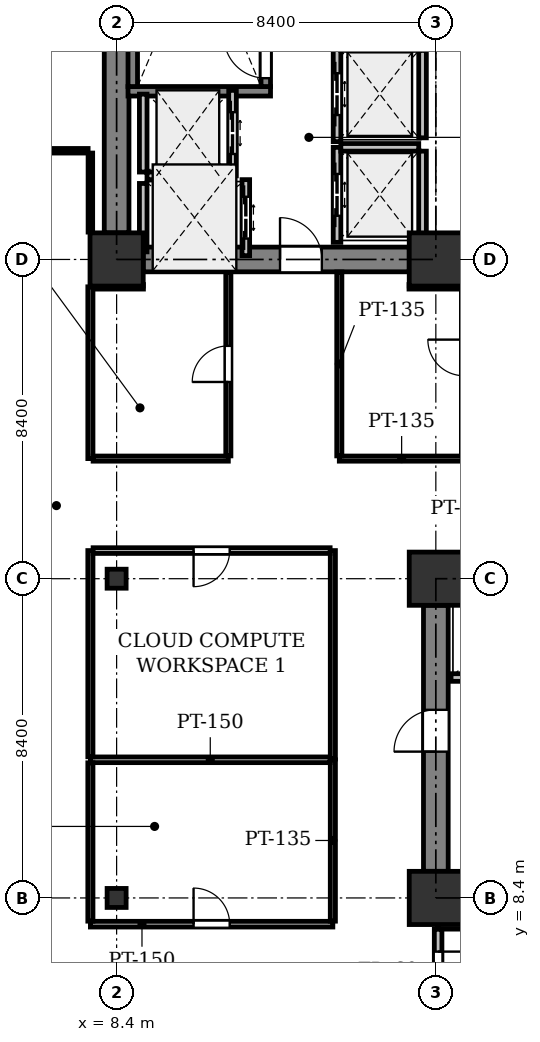
"""IFC4 building model, lengths in metres.
Left out: names, types, materials, properties, quantities, classifications, styles, units other than length and angle.
Written with IfcOpenShell. Run it as: python <this file> out.ifc"""

import sys

from ifc_helpers import new_model, si_unit, direction, frame, frame_2d, origin, origin_2d, place, context, subcontext, project, spatial, rectangle, i_section, extrude, element, fill, save


model = new_model("IFC4")
c1 = context("Model", 3, precision=1e-05, world=origin(), true_north=direction((0.0, 1.0)))
c2 = subcontext(c1, "Body", "Model", "MODEL_VIEW")
j1 = project(units=[si_unit("LENGTHUNIT", "METRE"), si_unit("PLANEANGLEUNIT", "RADIAN")], contexts=[c1])
p1 = place(None, origin())
s1 = spatial("IfcSite", under=j1, at=p1, CompositionType="ELEMENT")
p2 = place(p1, origin())
s2 = spatial("IfcBuilding", under=s1, at=p2, CompositionType="ELEMENT")
p3 = place(p2, frame((0.0, 0.0, 71.0)))
s3 = spatial("IfcBuildingStorey", under=s2, at=p3, CompositionType="ELEMENT", Elevation=71.0)
for number, where, z_axis, x_axis in (
    (1, (8.4, 8.4, 0.0), (0.0, 0.0, 1.0), (1.0, 0.0, 0.0)),
    (2, (8.4, 16.8, 0.0), (0.0, 0.0, 1.0), (1.0, 0.0, 0.0)),
):
    element("IfcColumn", number, at=place(p3, frame(where, z_axis=z_axis, x_axis=x_axis)), inside=s3, PredefinedType="COLUMN", context=c2, shape_type="SweptSolid", body=[
        extrude(i_section(OverallWidth=0.5, OverallDepth=0.5, WebThickness=0.028, FlangeThickness=0.04, at=origin_2d()), origin(), (0.0, 0.0, 1.0), 4.2),
    ])
for number, where, z_axis, x_axis in (
    (3, (8.4, 25.2, 0.0), (0.0, 0.0, 1.0), (1.0, 0.0, 0.0)),
    (4, (16.8, 8.4, 0.0), (0.0, 0.0, 1.0), (1.0, 0.0, 0.0)),
    (5, (16.8, 16.8, 0.0), (0.0, 0.0, 1.0), (1.0, 0.0, 0.0)),
    (6, (16.8, 25.2, 0.0), (0.0, 0.0, 1.0), (1.0, 0.0, 0.0)),
):
    element("IfcColumn", number, at=place(p3, frame(where, z_axis=z_axis, x_axis=x_axis)), inside=s3, PredefinedType="COLUMN", context=c2, shape_type="SweptSolid", body=[
        extrude(rectangle(XDim=1.4, YDim=1.4, at=origin_2d()), origin(), (0.0, 0.0, 1.0), 4.2),
    ])
p4 = place(p3, frame((8.4, 25.9, 0.0), z_axis=(0.0, 0.0, 1.0), x_axis=(0.0, 1.0, 0.0)))
e7 = element("IfcWall", 7, at=p4, inside=s3, PredefinedType="SHEAR", context=c2, shape_type="SweptSolid", body=[
    extrude(rectangle(XDim=7.0, YDim=0.65, at=frame_2d((3.5, 0.0))), origin(), (0.0, 0.0, 1.0), 3.925),
])
p5 = place(p3, frame((9.1, 25.2, 0.0), z_axis=(0.0, 0.0, 1.0), x_axis=(1.0, 0.0, 0.0)))
e8 = element("IfcWall", 8, at=p5, inside=s3, PredefinedType="SHEAR", context=c2, shape_type="SweptSolid", body=[
    extrude(rectangle(XDim=7.0, YDim=0.65, at=frame_2d((3.5, 0.0))), origin(), (0.0, 0.0, 1.0), 3.925),
])
p6 = place(p5, frame((3.6, 0.0, 0.0)))
e9 = element("IfcOpeningElement", 9, at=p6, cuts=e8, PredefinedType="OPENING", context=c2, shape_type="SweptSolid", body=[
    extrude(rectangle(XDim=1.1, YDim=2.15, at=frame_2d((0.55, 1.075))), frame((0.0, 0.335, 0.0), z_axis=(0.0, -1.0, 0.0), x_axis=(1.0, 0.0, 0.0)), (0.0, 0.0, 1.0), 0.67),
])
p7 = place(p3, frame((16.8, 9.1, 0.0), z_axis=(0.0, 0.0, 1.0), x_axis=(0.0, 1.0, 0.0)))
e10 = element("IfcWall", 10, at=p7, inside=s3, PredefinedType="SHEAR", context=c2, shape_type="SweptSolid", body=[
    extrude(rectangle(XDim=7.0, YDim=0.65, at=frame_2d((3.5, 0.0))), origin(), (0.0, 0.0, 1.0), 3.925),
])
p8 = place(p7, frame((3.15, 0.0, 0.0)))
e11 = element("IfcOpeningElement", 11, at=p8, cuts=e10, PredefinedType="OPENING", context=c2, shape_type="SweptSolid", body=[
    extrude(rectangle(XDim=1.1, YDim=2.15, at=frame_2d((0.55, 1.075))), frame((0.0, 0.335, 0.0), z_axis=(0.0, -1.0, 0.0), x_axis=(1.0, 0.0, 0.0)), (0.0, 0.0, 1.0), 0.67),
])
p9 = place(p3, frame((12.45, 29.625, 0.0), z_axis=(0.0, 0.0, 1.0), x_axis=(-1.0, 0.0, 0.0)))
e12 = element("IfcWall", 12, at=p9, inside=s3, PredefinedType="SHEAR", context=c2, shape_type="SweptSolid", body=[
    extrude(rectangle(XDim=3.75, YDim=0.25, at=frame_2d((1.875, 0.0))), origin(), (0.0, 0.0, 1.0), 3.925),
])
p10 = place(p3, frame((12.325, 29.75, 0.0), z_axis=(0.0, 0.0, 1.0), x_axis=(0.0, 1.0, 0.0)))
e13 = element("IfcWall", 13, at=p10, inside=s3, PredefinedType="SHEAR", context=c2, shape_type="SweptSolid", body=[
    extrude(rectangle(XDim=7.75, YDim=0.25, at=frame_2d((3.875, 0.0))), origin(), (0.0, 0.0, 1.0), 3.925),
])
p11 = place(p10, frame((0.22, 0.0, 0.0)))
e14 = element("IfcOpeningElement", 14, at=p11, cuts=e13, PredefinedType="OPENING", context=c2, shape_type="SweptSolid", body=[
    extrude(rectangle(XDim=1.1, YDim=2.15, at=frame_2d((0.55, 1.075))), frame((0.0, 0.135, 0.0), z_axis=(0.0, -1.0, 0.0), x_axis=(1.0, 0.0, 0.0)), (0.0, 0.0, 1.0), 0.27),
])
p12 = place(p3, frame((8.825, 29.75, 0.0), z_axis=(0.0, 0.0, 1.0), x_axis=(0.0, 1.0, 0.0)))
e15 = element("IfcWall", 15, at=p12, inside=s3, PredefinedType="SHEAR", context=c2, shape_type="SweptSolid", body=[
    extrude(rectangle(XDim=7.75, YDim=0.25, at=frame_2d((3.875, 0.0))), origin(), (0.0, 0.0, 1.0), 3.925),
])
p13 = place(p3, frame((11.45, 27.4, 0.0), z_axis=(0.0, 0.0, 1.0), x_axis=(0.0, 1.0, 0.0)))
e16 = element("IfcWall", 16, at=p13, inside=s3, PredefinedType="PARTITIONING", context=c2, shape_type="SweptSolid", body=[
    extrude(rectangle(XDim=2.25, YDim=0.2, at=frame_2d((1.125, 0.0))), origin(), (0.0, 0.0, 1.0), 3.925),
])
p14 = place(p13, frame((0.575, 0.0, 0.0)))
e17 = element("IfcOpeningElement", 17, at=p14, cuts=e16, PredefinedType="OPENING", context=c2, shape_type="SweptSolid", body=[
    extrude(rectangle(XDim=1.1, YDim=2.2, at=frame_2d((0.55, 1.1))), frame((0.0, 0.11, 0.0), z_axis=(0.0, -1.0, 0.0), x_axis=(1.0, 0.0, 0.0)), (0.0, 0.0, 1.0), 0.22),
])
p15 = place(p3, frame((9.1, 27.5, 0.0), z_axis=(0.0, 0.0, 1.0), x_axis=(0.0, 1.0, 0.0)))
e18 = element("IfcWall", 18, at=p15, inside=s3, PredefinedType="PARTITIONING", context=c2, shape_type="SweptSolid", body=[
    extrude(rectangle(XDim=2.05, YDim=0.2, at=frame_2d((1.025, 0.0))), origin(), (0.0, 0.0, 1.0), 3.925),
])
p16 = place(p3, frame((9.2, 27.4, 0.0), z_axis=(0.0, 0.0, 1.0), x_axis=(1.0, 0.0, 0.0)))
e19 = element("IfcWall", 19, at=p16, inside=s3, PredefinedType="PARTITIONING", context=c2, shape_type="SweptSolid", body=[
    extrude(rectangle(XDim=2.15, YDim=0.2, at=frame_2d((1.075, 0.0))), origin(), (0.0, 0.0, 1.0), 3.925),
])
p17 = place(p3, frame((11.8, 25.3, 0.0), z_axis=(0.0, 0.0, 1.0), x_axis=(0.0, 1.0, 0.0)))
e20 = element("IfcWall", 20, at=p17, inside=s3, PredefinedType="PARTITIONING", context=c2, shape_type="SweptSolid", body=[
    extrude(rectangle(XDim=2.0, YDim=0.2, at=frame_2d((1.0, 0.0))), origin(), (0.0, 0.0, 1.0), 3.925),
])
p18 = place(p17, frame((0.45, 0.0, 0.0)))
e21 = element("IfcOpeningElement", 21, at=p18, cuts=e20, PredefinedType="OPENING", context=c2, shape_type="SweptSolid", body=[
    extrude(rectangle(XDim=1.1, YDim=2.2, at=frame_2d((0.55, 1.1))), frame((0.0, 0.11, 0.0), z_axis=(0.0, -1.0, 0.0), x_axis=(1.0, 0.0, 0.0)), (0.0, 0.0, 1.0), 0.22),
])
p19 = place(p3, frame((9.1, 25.4, 0.0), z_axis=(0.0, 0.0, 1.0), x_axis=(0.0, 1.0, 0.0)))
e22 = element("IfcWall", 22, at=p19, inside=s3, PredefinedType="PARTITIONING", context=c2, shape_type="SweptSolid", body=[
    extrude(rectangle(XDim=1.8, YDim=0.2, at=frame_2d((0.9, 0.0))), origin(), (0.0, 0.0, 1.0), 3.925),
])
p20 = place(p3, frame((14.2, 25.65, 0.0), z_axis=(0.0, 0.0, 1.0), x_axis=(0.0, 1.0, 0.0)))
e23 = element("IfcWall", 23, at=p20, inside=s3, PredefinedType="PARTITIONING", context=c2, shape_type="SweptSolid", body=[
    extrude(rectangle(XDim=2.5, YDim=0.2, at=frame_2d((1.25, 0.0))), origin(), (0.0, 0.0, 1.0), 3.925),
])
p21 = place(p20, frame((0.7, 0.0, 0.0)))
e24 = element("IfcOpeningElement", 24, at=p21, cuts=e23, PredefinedType="OPENING", context=c2, shape_type="SweptSolid", body=[
    extrude(rectangle(XDim=1.1, YDim=2.2, at=frame_2d((0.55, 1.1))), frame((0.0, 0.11, 0.0), z_axis=(0.0, -1.0, 0.0), x_axis=(1.0, 0.0, 0.0)), (0.0, 0.0, 1.0), 0.22),
])
p22 = place(p3, frame((16.45, 25.75, 0.0), z_axis=(0.0, 0.0, 1.0), x_axis=(0.0, 1.0, 0.0)))
e25 = element("IfcWall", 25, at=p22, inside=s3, PredefinedType="PARTITIONING", context=c2, shape_type="SweptSolid", body=[
    extrude(rectangle(XDim=2.3, YDim=0.2, at=frame_2d((1.15, 0.0))), origin(), (0.0, 0.0, 1.0), 3.925),
])
p23 = place(p3, frame((14.3, 28.15, 0.0), z_axis=(0.0, 0.0, 1.0), x_axis=(1.0, 0.0, 0.0)))
e26 = element("IfcWall", 26, at=p23, inside=s3, PredefinedType="PARTITIONING", context=c2, shape_type="SweptSolid", body=[
    extrude(rectangle(XDim=2.05, YDim=0.2, at=frame_2d((1.025, 0.0))), origin(), (0.0, 0.0, 1.0), 3.925),
])
p24 = place(p3, frame((14.2, 28.3, 0.0), z_axis=(0.0, 0.0, 1.0), x_axis=(0.0, 1.0, 0.0)))
e27 = element("IfcWall", 27, at=p24, inside=s3, PredefinedType="PARTITIONING", context=c2, shape_type="SweptSolid", body=[
    extrude(rectangle(XDim=2.5, YDim=0.2, at=frame_2d((1.25, 0.0))), origin(), (0.0, 0.0, 1.0), 3.925),
])
p25 = place(p24, frame((0.7, 0.0, 0.0)))
e28 = element("IfcOpeningElement", 28, at=p25, cuts=e27, PredefinedType="OPENING", context=c2, shape_type="SweptSolid", body=[
    extrude(rectangle(XDim=1.1, YDim=2.2, at=frame_2d((0.55, 1.1))), frame((0.0, 0.11, 0.0), z_axis=(0.0, -1.0, 0.0), x_axis=(1.0, 0.0, 0.0)), (0.0, 0.0, 1.0), 0.22),
])
p26 = place(p3, frame((16.45, 28.4, 0.0), z_axis=(0.0, 0.0, 1.0), x_axis=(0.0, 1.0, 0.0)))
e29 = element("IfcWall", 29, at=p26, inside=s3, PredefinedType="PARTITIONING", context=c2, shape_type="SweptSolid", body=[
    extrude(rectangle(XDim=2.3, YDim=0.2, at=frame_2d((1.15, 0.0))), origin(), (0.0, 0.0, 1.0), 3.925),
])
p27 = place(p3, frame((17.2, 14.2, 0.0), z_axis=(0.0, 0.0, 1.0), x_axis=(1.0, 0.0, 0.0)))
e30 = element("IfcWall", 30, at=p27, inside=s3, PredefinedType="PARTITIONING", context=c2, shape_type="SweptSolid", body=[
    extrude(rectangle(XDim=2.45, YDim=0.2, at=frame_2d((1.225, 0.0))), origin(), (0.0, 0.0, 1.0), 3.925),
])
p28 = place(p3, frame((17.3, 16.45, 0.0), z_axis=(0.0, 0.0, 1.0), x_axis=(1.0, 0.0, 0.0)))
e31 = element("IfcWall", 31, at=p28, inside=s3, PredefinedType="PARTITIONING", context=c2, shape_type="SweptSolid", body=[
    extrude(rectangle(XDim=2.25, YDim=0.2, at=frame_2d((1.125, 0.0))), origin(), (0.0, 0.0, 1.0), 3.925),
])
p29 = place(p3, frame((14.26, 19.96, 0.0), z_axis=(0.0, 0.0, 1.0), x_axis=(1.0, 0.0, 0.0)))
e32 = element("IfcWall", 32, at=p29, inside=s3, PredefinedType="PARTITIONING", context=c2, shape_type="SweptSolid", body=[
    extrude(rectangle(XDim=3.28, YDim=0.135, at=frame_2d((1.64, 0.0))), origin(), (0.0, 0.0, 1.0), 3.323),
])
p30 = place(p3, frame((17.469, 24.48, 0.0), z_axis=(0.0, 0.0, 1.0), x_axis=(-0.99999974752, 0.000710605612, 0.0)))
e33 = element("IfcWall", 33, at=p30, inside=s3, PredefinedType="PARTITIONING", context=c2, shape_type="SweptSolid", body=[
    extrude(rectangle(XDim=1.374, YDim=0.12, at=frame_2d((0.687, 0.0))), origin(), (0.0, 0.0, 1.0), 3.323),
])
p31 = place(p3, frame((14.26, 24.871, 0.0), z_axis=(0.0, 0.0, 1.0), x_axis=(0.0, -1.0, 0.0)))
e34 = element("IfcWall", 34, at=p31, inside=s3, PredefinedType="PARTITIONING", context=c2, shape_type="SweptSolid", body=[
    extrude(rectangle(XDim=4.84, YDim=0.135, at=frame_2d((2.42, 0.0))), origin(), (0.0, 0.0, 1.0), 3.925),
])
p32 = place(p3, frame((7.71, 7.71, 0.0), z_axis=(0.0, 0.0, 1.0), x_axis=(1.0, 0.0, 0.0)))
e35 = element("IfcWall", 35, at=p32, inside=s3, PredefinedType="PARTITIONING", context=c2, shape_type="SweptSolid", body=[
    extrude(rectangle(XDim=6.38, YDim=0.15, at=frame_2d((3.19, 0.0))), origin(), (0.0, 0.0, 1.0), 3.323),
])
p33 = place(p32, frame((2.715, 0.0, 0.0)))
e36 = element("IfcOpeningElement", 36, at=p33, cuts=e35, PredefinedType="OPENING", context=c2, shape_type="SweptSolid", body=[
    extrude(rectangle(XDim=0.95, YDim=2.15, at=frame_2d((0.475, 1.075))), frame((0.0, 0.085, 0.0), z_axis=(0.0, -1.0, 0.0), x_axis=(1.0, 0.0, 0.0)), (0.0, 0.0, 1.0), 0.17),
])
p34 = place(p3, frame((14.09, 7.789, 0.0), z_axis=(0.0, 0.0, 1.0), x_axis=(0.0, 1.0, 0.0)))
e37 = element("IfcWall", 37, at=p34, inside=s3, PredefinedType="PARTITIONING", context=c2, shape_type="SweptSolid", body=[
    extrude(rectangle(XDim=4.246, YDim=0.135, at=frame_2d((2.123, 0.0))), origin(), (0.0, 0.0, 1.0), 3.313),
])
p35 = place(p3, frame((14.019, 12.035, 0.0), z_axis=(0.0, 0.0, 1.0), x_axis=(-1.0, 0.0, 0.0)))
e38 = element("IfcWall", 38, at=p35, inside=s3, PredefinedType="PARTITIONING", context=c2, shape_type="SweptSolid", body=[
    extrude(rectangle(XDim=6.309, YDim=0.15, at=frame_2d((3.154, 0.0))), origin(), (0.0, 0.0, 1.0), 3.323),
])
p36 = place(p3, frame((7.71, 11.956, 0.0), z_axis=(0.0, 0.0, 1.0), x_axis=(0.0, -1.0, 0.0)))
e39 = element("IfcWall", 39, at=p36, inside=s3, PredefinedType="PARTITIONING", context=c2, shape_type="SweptSolid", body=[
    extrude(rectangle(XDim=4.167, YDim=0.135, at=frame_2d((2.083, 0.0))), origin(), (0.0, 0.0, 1.0), 3.313),
])
p37 = place(p3, frame((7.71, 17.54, 0.0), z_axis=(0.0, 0.0, 1.0), x_axis=(0.0, -1.0, 0.0)))
e40 = element("IfcWall", 40, at=p37, inside=s3, PredefinedType="PARTITIONING", context=c2, shape_type="SweptSolid", body=[
    extrude(rectangle(XDim=5.426, YDim=0.135, at=frame_2d((2.713, 0.0))), origin(), (0.0, 0.0, 1.0), 3.313),
])
p38 = place(p3, frame((14.09, 12.055, 0.0), z_axis=(0.0, 0.0, 1.0), x_axis=(0.0, 1.0, 0.0)))
e41 = element("IfcWall", 41, at=p38, inside=s3, PredefinedType="PARTITIONING", context=c2, shape_type="SweptSolid", body=[
    extrude(rectangle(XDim=5.485, YDim=0.135, at=frame_2d((2.742, 0.0))), origin(), (0.0, 0.0, 1.0), 3.313),
])
p39 = place(p3, frame((14.019, 17.54, 0.0), z_axis=(0.0, 0.0, 1.0), x_axis=(-1.0, 0.0, 0.0)))
e42 = element("IfcWall", 42, at=p39, inside=s3, PredefinedType="PARTITIONING", context=c2, shape_type="SweptSolid", body=[
    extrude(rectangle(XDim=6.237, YDim=0.15, at=frame_2d((3.119, 0.0))), origin(), (0.0, 0.0, 1.0), 3.323),
])
p40 = place(p39, frame((2.644, 0.0, 0.0)))
e43 = element("IfcOpeningElement", 43, at=p40, cuts=e42, PredefinedType="OPENING", context=c2, shape_type="SweptSolid", body=[
    extrude(rectangle(XDim=0.95, YDim=2.15, at=frame_2d((0.475, 1.075))), frame((0.0, 0.085, 0.0), z_axis=(0.0, -1.0, 0.0), x_axis=(1.0, 0.0, 0.0)), (0.0, 0.0, 1.0), 0.17),
])
p41 = place(p3, frame((17.5, 7.68, 0.0), z_axis=(0.0, 0.0, 1.0), x_axis=(-1.0, 0.0, 0.0)))
e44 = element("IfcWall", 44, at=p41, inside=s3, PredefinedType="PARTITIONING", context=c2, shape_type="SweptSolid", body=[
    extrude(rectangle(XDim=0.64, YDim=0.2, at=frame_2d((0.32, 0.0))), origin(), (0.0, 0.0, 1.0), 3.323),
])
p42 = place(p3, frame((16.86, 7.576, 0.0), z_axis=(0.0, 0.0, 1.0), x_axis=(0.0, -1.0, 0.0)))
e45 = element("IfcWall", 45, at=p42, inside=s3, PredefinedType="PARTITIONING", context=c2, shape_type="SweptSolid", body=[
    extrude(rectangle(XDim=2.176, YDim=0.2, at=frame_2d((1.088, 0.0))), origin(), (0.0, 0.0, 1.0), 3.323),
])
p43 = place(p42, frame((0.588, 0.0, 0.0)))
e46 = element("IfcOpeningElement", 46, at=p43, cuts=e45, PredefinedType="OPENING", context=c2, shape_type="SweptSolid", body=[
    extrude(rectangle(XDim=1.0, YDim=2.15, at=frame_2d((0.5, 1.075))), frame((0.0, 0.11, 0.0), z_axis=(0.0, -1.0, 0.0), x_axis=(1.0, 0.0, 0.0)), (0.0, 0.0, 1.0), 0.22),
])
p44 = place(p3, frame((5.4, 28.06, 0.0), z_axis=(0.0, 0.0, 1.0), x_axis=(1.0, 0.0, 0.0)))
e47 = element("IfcWall", 47, at=p44, inside=s3, PredefinedType="PARTITIONING", context=c2, shape_type="SweptSolid", body=[
    extrude(rectangle(XDim=2.25, YDim=0.12, at=frame_2d((1.125, 0.0))), origin(), (0.0, 0.0, 1.0), 3.925),
])
p45 = place(p3, frame((7.71, 28.0, 0.0), z_axis=(0.0, 0.0, 1.0), x_axis=(0.0, -1.0, 0.0)))
e48 = element("IfcWall", 48, at=p45, inside=s3, PredefinedType="PARTITIONING", context=c2, shape_type="SweptSolid", body=[
    extrude(rectangle(XDim=2.08, YDim=0.12, at=frame_2d((1.04, 0.0))), origin(), (0.0, 0.0, 1.0), 3.925),
])
p46 = place(p3, frame((9.106, 24.481, 0.0), z_axis=(0.0, 0.0, 1.0), x_axis=(-0.999999755233, -0.000699667487, 0.0)))
e49 = element("IfcWall", 49, at=p46, inside=s3, PredefinedType="PARTITIONING", context=c2, shape_type="SweptSolid", body=[
    extrude(rectangle(XDim=1.396, YDim=0.12, at=frame_2d((0.698, 0.0))), origin(), (0.0, 0.0, 1.0), 3.323),
])
p47 = place(p3, frame((7.71, 24.48, 0.0), z_axis=(0.0, 0.0, 1.0), x_axis=(0.0, -1.0, 0.0)))
e50 = element("IfcWall", 50, at=p47, inside=s3, PredefinedType="PARTITIONING", context=c2, shape_type="SweptSolid", body=[
    extrude(rectangle(XDim=4.52, YDim=0.135, at=frame_2d((2.26, 0.0))), origin(), (0.0, 0.0, 1.0), 3.925),
])
p48 = place(p3, frame((7.781, 19.96, 0.0), z_axis=(0.0, 0.0, 1.0), x_axis=(1.0, 0.0, 0.0)))
e51 = element("IfcWall", 51, at=p48, inside=s3, PredefinedType="PARTITIONING", context=c2, shape_type="SweptSolid", body=[
    extrude(rectangle(XDim=3.559, YDim=0.135, at=frame_2d((1.779, 0.0))), origin(), (0.0, 0.0, 1.0), 3.323),
])
p49 = place(p3, frame((11.34, 20.031, 0.0), z_axis=(0.0, 0.0, 1.0), x_axis=(0.0, 1.0, 0.0)))
e52 = element("IfcWall", 52, at=p49, inside=s3, PredefinedType="PARTITIONING", context=c2, shape_type="SweptSolid", body=[
    extrude(rectangle(XDim=4.84, YDim=0.135, at=frame_2d((2.42, 0.0))), origin(), (0.0, 0.0, 1.0), 3.925),
])
p50 = place(p49, frame((1.945, 0.0, 0.0)))
e53 = element("IfcOpeningElement", 53, at=p50, cuts=e52, PredefinedType="OPENING", context=c2, shape_type="SweptSolid", body=[
    extrude(rectangle(XDim=0.95, YDim=2.15, at=frame_2d((0.475, 1.075))), frame((0.0, 0.077, 0.0), z_axis=(0.0, -1.0, 0.0), x_axis=(1.0, 0.0, 0.0)), (0.0, 0.0, 1.0), 0.155),
])
p51 = place(p6, origin())
e54 = element("IfcDoor", 54, at=p51, inside=s3, OperationType="SINGLE_SWING_LEFT", PredefinedType="DOOR", context=c2, shape_type="SweptSolid", body=[
    extrude(rectangle(XDim=1.1, YDim=2.15, at=frame_2d((0.55, 1.075))), frame((0.0, 0.025, 0.0), z_axis=(0.0, -1.0, 0.0), x_axis=(1.0, 0.0, 0.0)), (0.0, 0.0, 1.0), 0.05),
])
fill(e9, e54)
p52 = place(p8, origin())
e55 = element("IfcDoor", 55, at=p52, inside=s3, OperationType="SINGLE_SWING_LEFT", PredefinedType="DOOR", context=c2, shape_type="SweptSolid", body=[
    extrude(rectangle(XDim=1.1, YDim=2.15, at=frame_2d((0.55, 1.075))), frame((0.0, 0.025, 0.0), z_axis=(0.0, -1.0, 0.0), x_axis=(1.0, 0.0, 0.0)), (0.0, 0.0, 1.0), 0.05),
])
fill(e11, e55)
p53 = place(p11, origin())
e56 = element("IfcDoor", 56, at=p53, inside=s3, OperationType="SINGLE_SWING_RIGHT", PredefinedType="DOOR", context=c2, shape_type="SweptSolid", body=[
    extrude(rectangle(XDim=1.1, YDim=2.15, at=frame_2d((0.55, 1.075))), frame((0.0, 0.025, 0.0), z_axis=(0.0, -1.0, 0.0), x_axis=(1.0, 0.0, 0.0)), (0.0, 0.0, 1.0), 0.05),
])
fill(e14, e56)
p54 = place(p14, origin())
e57 = element("IfcDoor", 57, at=p54, inside=s3, OperationType="DOUBLE_DOOR_SLIDING", PredefinedType="DOOR", context=c2, shape_type="SweptSolid", body=[
    extrude(rectangle(XDim=1.1, YDim=2.2, at=frame_2d((0.55, 1.1))), frame((0.0, 0.025, 0.0), z_axis=(0.0, -1.0, 0.0), x_axis=(1.0, 0.0, 0.0)), (0.0, 0.0, 1.0), 0.05),
])
fill(e17, e57)
p55 = place(p18, origin())
e58 = element("IfcDoor", 58, at=p55, inside=s3, OperationType="DOUBLE_DOOR_SLIDING", PredefinedType="DOOR", context=c2, shape_type="SweptSolid", body=[
    extrude(rectangle(XDim=1.1, YDim=2.2, at=frame_2d((0.55, 1.1))), frame((0.0, 0.025, 0.0), z_axis=(0.0, -1.0, 0.0), x_axis=(1.0, 0.0, 0.0)), (0.0, 0.0, 1.0), 0.05),
])
fill(e21, e58)
p56 = place(p21, origin())
e59 = element("IfcDoor", 59, at=p56, inside=s3, OperationType="DOUBLE_DOOR_SLIDING", PredefinedType="DOOR", context=c2, shape_type="SweptSolid", body=[
    extrude(rectangle(XDim=1.1, YDim=2.2, at=frame_2d((0.55, 1.1))), frame((0.0, 0.025, 0.0), z_axis=(0.0, -1.0, 0.0), x_axis=(1.0, 0.0, 0.0)), (0.0, 0.0, 1.0), 0.05),
])
fill(e24, e59)
p57 = place(p25, origin())
e60 = element("IfcDoor", 60, at=p57, inside=s3, OperationType="DOUBLE_DOOR_SLIDING", PredefinedType="DOOR", context=c2, shape_type="SweptSolid", body=[
    extrude(rectangle(XDim=1.1, YDim=2.2, at=frame_2d((0.55, 1.1))), frame((0.0, 0.025, 0.0), z_axis=(0.0, -1.0, 0.0), x_axis=(1.0, 0.0, 0.0)), (0.0, 0.0, 1.0), 0.05),
])
fill(e28, e60)
p58 = place(p33, origin())
e61 = element("IfcDoor", 61, at=p58, inside=s3, OperationType="SINGLE_SWING_LEFT", PredefinedType="DOOR", context=c2, shape_type="SweptSolid", body=[
    extrude(rectangle(XDim=0.95, YDim=2.15, at=frame_2d((0.475, 1.075))), frame((0.0, 0.025, 0.0), z_axis=(0.0, -1.0, 0.0), x_axis=(1.0, 0.0, 0.0)), (0.0, 0.0, 1.0), 0.05),
])
fill(e36, e61)
p59 = place(p40, origin())
e62 = element("IfcDoor", 62, at=p59, inside=s3, OperationType="SINGLE_SWING_RIGHT", PredefinedType="DOOR", context=c2, shape_type="SweptSolid", body=[
    extrude(rectangle(XDim=0.95, YDim=2.15, at=frame_2d((0.475, 1.075))), frame((0.0, 0.025, 0.0), z_axis=(0.0, -1.0, 0.0), x_axis=(1.0, 0.0, 0.0)), (0.0, 0.0, 1.0), 0.05),
])
fill(e43, e62)
p60 = place(p43, origin())
e63 = element("IfcDoor", 63, at=p60, inside=s3, OperationType="SINGLE_SWING_LEFT", PredefinedType="DOOR", context=c2, shape_type="SweptSolid", body=[
    extrude(rectangle(XDim=1.0, YDim=2.15, at=frame_2d((0.5, 1.075))), frame((0.0, 0.025, 0.0), z_axis=(0.0, -1.0, 0.0), x_axis=(1.0, 0.0, 0.0)), (0.0, 0.0, 1.0), 0.05),
])
fill(e46, e63)
p61 = place(p50, origin())
e64 = element("IfcDoor", 64, at=p61, inside=s3, OperationType="SINGLE_SWING_LEFT", PredefinedType="DOOR", context=c2, shape_type="SweptSolid", body=[
    extrude(rectangle(XDim=0.95, YDim=2.15, at=frame_2d((0.475, 1.075))), frame((0.0, 0.025, 0.0), z_axis=(0.0, -1.0, 0.0), x_axis=(1.0, 0.0, 0.0)), (0.0, 0.0, 1.0), 0.05),
])
fill(e53, e64)
save(model, sys.argv[1])
